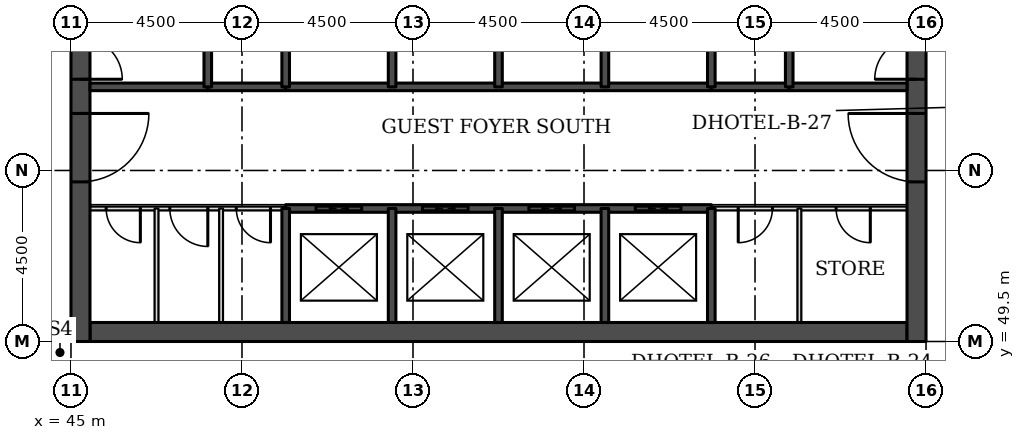
"""IFC4 building model, lengths in metres.
Left out: names, types, materials, properties, quantities, classifications, styles, units other than length and angle.
Written with IfcOpenShell. Run it as: python <this file> out.ifc"""

import sys

from ifc_helpers import new_model, si_unit, direction, frame, frame_2d, origin, place, context, subcontext, project, spatial, rectangle, extrude, element, fill, save


model = new_model("IFC4")
c1 = context("Model", 3, precision=1e-05, world=origin(), true_north=direction((0.0, 1.0)))
c2 = subcontext(c1, "Body", "Model", "MODEL_VIEW")
j1 = project(units=[si_unit("LENGTHUNIT", "METRE"), si_unit("PLANEANGLEUNIT", "RADIAN")], contexts=[c1])
p1 = place(None, origin())
s1 = spatial("IfcSite", under=j1, at=p1, CompositionType="ELEMENT")
p2 = place(p1, origin())
s2 = spatial("IfcBuilding", under=s1, at=p2, CompositionType="ELEMENT")
p3 = place(p2, frame((0.0, 0.0, 52.8)))
s3 = spatial("IfcBuildingStorey", under=s2, at=p3, CompositionType="ELEMENT", Elevation=52.8)
p4 = place(p3, frame((45.5, 49.75, 0.0), z_axis=(0.0, 0.0, 1.0), x_axis=(1.0, 0.0, 0.0)))
e1 = element("IfcWall", 1, at=p4, inside=s3, PredefinedType="SHEAR", context=c2, shape_type="SweptSolid", body=[
    extrude(rectangle(XDim=21.5, YDim=0.5, at=frame_2d((10.75, 0.0))), origin(), (0.0, 0.0, 1.0), 3.3),
])
p5 = place(p3, frame((45.25, 49.5, 0.0), z_axis=(0.0, 0.0, 1.0), x_axis=(0.0, 1.0, 0.0)))
e2 = element("IfcWall", 2, at=p5, inside=s3, PredefinedType="SHEAR", context=c2, shape_type="SweptSolid", body=[
    extrude(rectangle(XDim=22.5, YDim=0.5, at=frame_2d((11.25, 0.0))), origin(), (0.0, 0.0, 1.0), 3.3),
])
p6 = place(p5, frame((4.2, 0.0, 0.0)))
e3 = element("IfcOpeningElement", 3, at=p6, cuts=e2, PredefinedType="OPENING", context=c2, shape_type="SweptSolid", body=[
    extrude(rectangle(XDim=1.8, YDim=2.1, at=frame_2d((0.9, 1.05))), frame((0.0, 0.26, 0.0), z_axis=(0.0, -1.0, 0.0), x_axis=(1.0, 0.0, 0.0)), (0.0, 0.0, 1.0), 0.52),
])
p7 = place(p5, frame((6.9, 0.0, 0.0)))
e4 = element("IfcOpeningElement", 4, at=p7, cuts=e2, PredefinedType="OPENING", context=c2, shape_type="SweptSolid", body=[
    extrude(rectangle(XDim=1.1, YDim=2.1, at=frame_2d((0.55, 1.05))), frame((0.0, 0.26, 0.0), z_axis=(0.0, -1.0, 0.0), x_axis=(1.0, 0.0, 0.0)), (0.0, 0.0, 1.0), 0.52),
])
p8 = place(p5, frame((13.6, 0.0, 0.0)))
e5 = element("IfcOpeningElement", 5, at=p8, cuts=e2, PredefinedType="OPENING", context=c2, shape_type="SweptSolid", body=[
    extrude(rectangle(XDim=1.1, YDim=2.1, at=frame_2d((0.55, 1.05))), frame((0.0, 0.26, 0.0), z_axis=(0.0, -1.0, 0.0), x_axis=(1.0, 0.0, 0.0)), (0.0, 0.0, 1.0), 0.52),
])
p9 = place(p5, frame((16.5, 0.0, 0.0)))
e6 = element("IfcOpeningElement", 6, at=p9, cuts=e2, PredefinedType="OPENING", context=c2, shape_type="SweptSolid", body=[
    extrude(rectangle(XDim=1.8, YDim=2.1, at=frame_2d((0.9, 1.05))), frame((0.0, 0.26, 0.0), z_axis=(0.0, -1.0, 0.0), x_axis=(1.0, 0.0, 0.0)), (0.0, 0.0, 1.0), 0.52),
])
p10 = place(p3, frame((67.25, 49.5, 0.0), z_axis=(0.0, 0.0, 1.0), x_axis=(0.0, 1.0, 0.0)))
e7 = element("IfcWall", 7, at=p10, inside=s3, PredefinedType="SHEAR", context=c2, shape_type="SweptSolid", body=[
    extrude(rectangle(XDim=22.5, YDim=0.5, at=frame_2d((11.25, 0.0))), origin(), (0.0, 0.0, 1.0), 3.3),
])
p11 = place(p10, frame((4.2, 0.0, 0.0)))
e8 = element("IfcOpeningElement", 8, at=p11, cuts=e7, PredefinedType="OPENING", context=c2, shape_type="SweptSolid", body=[
    extrude(rectangle(XDim=1.8, YDim=2.1, at=frame_2d((0.9, 1.05))), frame((0.0, 0.26, 0.0), z_axis=(0.0, -1.0, 0.0), x_axis=(1.0, 0.0, 0.0)), (0.0, 0.0, 1.0), 0.52),
])
p12 = place(p10, frame((6.9, 0.0, 0.0)))
e9 = element("IfcOpeningElement", 9, at=p12, cuts=e7, PredefinedType="OPENING", context=c2, shape_type="SweptSolid", body=[
    extrude(rectangle(XDim=1.1, YDim=2.1, at=frame_2d((0.55, 1.05))), frame((0.0, 0.26, 0.0), z_axis=(0.0, -1.0, 0.0), x_axis=(1.0, 0.0, 0.0)), (0.0, 0.0, 1.0), 0.52),
])
p13 = place(p10, frame((13.6, 0.0, 0.0)))
e10 = element("IfcOpeningElement", 10, at=p13, cuts=e7, PredefinedType="OPENING", context=c2, shape_type="SweptSolid", body=[
    extrude(rectangle(XDim=1.1, YDim=2.1, at=frame_2d((0.55, 1.05))), frame((0.0, 0.26, 0.0), z_axis=(0.0, -1.0, 0.0), x_axis=(1.0, 0.0, 0.0)), (0.0, 0.0, 1.0), 0.52),
])
p14 = place(p10, frame((16.5, 0.0, 0.0)))
e11 = element("IfcOpeningElement", 11, at=p14, cuts=e7, PredefinedType="OPENING", context=c2, shape_type="SweptSolid", body=[
    extrude(rectangle(XDim=1.8, YDim=2.1, at=frame_2d((0.9, 1.05))), frame((0.0, 0.26, 0.0), z_axis=(0.0, -1.0, 0.0), x_axis=(1.0, 0.0, 0.0)), (0.0, 0.0, 1.0), 0.52),
])
p15 = place(p3, frame((45.5, 53.0, 0.0), z_axis=(0.0, 0.0, 1.0), x_axis=(1.0, 0.0, 0.0)))
e12 = element("IfcWall", 12, at=p15, inside=s3, PredefinedType="PARTITIONING", context=c2, shape_type="SweptSolid", body=[
    extrude(rectangle(XDim=5.15, YDim=0.1, at=frame_2d((2.575, 0.0))), origin(), (0.0, 0.0, 1.0), 3.08),
])
p16 = place(p15, frame((0.426, 0.0, 0.0)))
e13 = element("IfcOpeningElement", 13, at=p16, cuts=e12, PredefinedType="OPENING", context=c2, shape_type="SweptSolid", body=[
    extrude(rectangle(XDim=0.9, YDim=2.1, at=frame_2d((0.45, 1.05))), frame((0.0, 0.06, 0.0), z_axis=(0.0, -1.0, 0.0), x_axis=(1.0, 0.0, 0.0)), (0.0, 0.0, 1.0), 0.12),
])
p17 = place(p15, frame((2.101, 0.0, 0.0)))
e14 = element("IfcOpeningElement", 14, at=p17, cuts=e12, PredefinedType="OPENING", context=c2, shape_type="SweptSolid", body=[
    extrude(rectangle(XDim=1.0, YDim=2.1, at=frame_2d((0.5, 1.05))), frame((0.0, 0.06, 0.0), z_axis=(0.0, -1.0, 0.0), x_axis=(1.0, 0.0, 0.0)), (0.0, 0.0, 1.0), 0.12),
])
p18 = place(p15, frame((3.85, 0.0, 0.0)))
e15 = element("IfcOpeningElement", 15, at=p18, cuts=e12, PredefinedType="OPENING", context=c2, shape_type="SweptSolid", body=[
    extrude(rectangle(XDim=0.9, YDim=2.1, at=frame_2d((0.45, 1.05))), frame((0.0, 0.06, 0.0), z_axis=(0.0, -1.0, 0.0), x_axis=(1.0, 0.0, 0.0)), (0.0, 0.0, 1.0), 0.12),
])
p19 = place(p3, frame((61.85, 53.0, 0.0), z_axis=(0.0, 0.0, 1.0), x_axis=(1.0, 0.0, 0.0)))
e16 = element("IfcWall", 16, at=p19, inside=s3, PredefinedType="PARTITIONING", context=c2, shape_type="SweptSolid", body=[
    extrude(rectangle(XDim=5.15, YDim=0.1, at=frame_2d((2.575, 0.0))), origin(), (0.0, 0.0, 1.0), 3.08),
])
p20 = place(p19, frame((3.284, 0.0, 0.0)))
e17 = element("IfcOpeningElement", 17, at=p20, cuts=e16, PredefinedType="OPENING", context=c2, shape_type="SweptSolid", body=[
    extrude(rectangle(XDim=0.9, YDim=2.1, at=frame_2d((0.45, 1.05))), frame((0.0, 0.06, 0.0), z_axis=(0.0, -1.0, 0.0), x_axis=(1.0, 0.0, 0.0)), (0.0, 0.0, 1.0), 0.12),
])
p21 = place(p19, frame((0.709, 0.0, 0.0)))
e18 = element("IfcOpeningElement", 18, at=p21, cuts=e16, PredefinedType="OPENING", context=c2, shape_type="SweptSolid", body=[
    extrude(rectangle(XDim=0.9, YDim=2.1, at=frame_2d((0.45, 1.05))), frame((0.0, 0.06, 0.0), z_axis=(0.0, -1.0, 0.0), x_axis=(1.0, 0.0, 0.0)), (0.0, 0.0, 1.0), 0.12),
])
p22 = place(p3, frame((50.65, 53.0, 0.0), z_axis=(0.0, 0.0, 1.0), x_axis=(1.0, 0.0, 0.0)))
e19 = element("IfcWall", 19, at=p22, inside=s3, PredefinedType="SOLIDWALL", context=c2, shape_type="SweptSolid", body=[
    extrude(rectangle(XDim=11.2, YDim=0.2, at=frame_2d((5.6, 0.0))), origin(), (0.0, 0.0, 1.0), 3.08),
])
p23 = place(p22, frame((0.8, 0.0, 0.0)))
e20 = element("IfcOpeningElement", 20, at=p23, cuts=e19, PredefinedType="OPENING", context=c2, shape_type="SweptSolid", body=[
    extrude(rectangle(XDim=1.2, YDim=2.1, at=frame_2d((0.6, 1.05))), frame((0.0, 0.11, 0.0), z_axis=(0.0, -1.0, 0.0), x_axis=(1.0, 0.0, 0.0)), (0.0, 0.0, 1.0), 0.22),
])
p24 = place(p22, frame((3.6, 0.0, 0.0)))
e21 = element("IfcOpeningElement", 21, at=p24, cuts=e19, PredefinedType="OPENING", context=c2, shape_type="SweptSolid", body=[
    extrude(rectangle(XDim=1.2, YDim=2.1, at=frame_2d((0.6, 1.05))), frame((0.0, 0.11, 0.0), z_axis=(0.0, -1.0, 0.0), x_axis=(1.0, 0.0, 0.0)), (0.0, 0.0, 1.0), 0.22),
])
p25 = place(p22, frame((6.4, 0.0, 0.0)))
e22 = element("IfcOpeningElement", 22, at=p25, cuts=e19, PredefinedType="OPENING", context=c2, shape_type="SweptSolid", body=[
    extrude(rectangle(XDim=1.2, YDim=2.1, at=frame_2d((0.6, 1.05))), frame((0.0, 0.11, 0.0), z_axis=(0.0, -1.0, 0.0), x_axis=(1.0, 0.0, 0.0)), (0.0, 0.0, 1.0), 0.22),
])
p26 = place(p22, frame((9.2, 0.0, 0.0)))
e23 = element("IfcOpeningElement", 23, at=p26, cuts=e19, PredefinedType="OPENING", context=c2, shape_type="SweptSolid", body=[
    extrude(rectangle(XDim=1.2, YDim=2.1, at=frame_2d((0.6, 1.05))), frame((0.0, 0.11, 0.0), z_axis=(0.0, -1.0, 0.0), x_axis=(1.0, 0.0, 0.0)), (0.0, 0.0, 1.0), 0.22),
])
for number, where, z_axis, x_axis in (
    (24, (48.6, 56.2, 0.0), (0.0, 0.0, 1.0), (1.0, 0.0, 0.0)),
    (25, (61.85, 56.2, 0.0), (0.0, 0.0, 1.0), (1.0, 0.0, 0.0)),
):
    element("IfcWall", number, at=place(p3, frame(where, z_axis=z_axis, x_axis=x_axis)), inside=s3, PredefinedType="SOLIDWALL", context=c2, shape_type="SweptSolid", body=[
        extrude(rectangle(XDim=2.05, YDim=0.2, at=frame_2d((1.025, 0.0))), origin(), (0.0, 0.0, 1.0), 3.08),
    ])
p27 = place(p3, frame((45.5, 56.2, 0.0), z_axis=(0.0, 0.0, 1.0), x_axis=(1.0, 0.0, 0.0)))
e26 = element("IfcWall", 26, at=p27, inside=s3, PredefinedType="SOLIDWALL", context=c2, shape_type="SweptSolid", body=[
    extrude(rectangle(XDim=3.1, YDim=0.2, at=frame_2d((1.55, 0.0))), origin(), (0.0, 0.0, 1.0), 3.08),
])
p28 = place(p3, frame((50.65, 56.2, 0.0), z_axis=(0.0, 0.0, 1.0), x_axis=(1.0, 0.0, 0.0)))
e27 = element("IfcWall", 27, at=p28, inside=s3, PredefinedType="SOLIDWALL", context=c2, shape_type="SweptSolid", body=[
    extrude(rectangle(XDim=11.2, YDim=0.2, at=frame_2d((5.6, 0.0))), origin(), (0.0, 0.0, 1.0), 3.08),
])
p29 = place(p3, frame((63.9, 56.2, 0.0), z_axis=(0.0, 0.0, 1.0), x_axis=(1.0, 0.0, 0.0)))
e28 = element("IfcWall", 28, at=p29, inside=s3, PredefinedType="SOLIDWALL", context=c2, shape_type="SweptSolid", body=[
    extrude(rectangle(XDim=3.1, YDim=0.2, at=frame_2d((1.55, 0.0))), origin(), (0.0, 0.0, 1.0), 3.08),
])
p30 = place(p3, frame((47.251, 50.0, 0.0), z_axis=(0.0, 0.0, 1.0), x_axis=(0.0, 1.0, 0.0)))
e29 = element("IfcWall", 29, at=p30, inside=s3, PredefinedType="PARTITIONING", context=c2, shape_type="SweptSolid", body=[
    extrude(rectangle(XDim=3.0, YDim=0.1, at=frame_2d((1.5, 0.0))), origin(), (0.0, 0.0, 1.0), 3.08),
])
p31 = place(p3, frame((48.6, 56.2, 0.0), z_axis=(0.0, 0.0, 1.0), x_axis=(0.0, 1.0, 0.0)))
e30 = element("IfcWall", 30, at=p31, inside=s3, PredefinedType="SOLIDWALL", context=c2, shape_type="SweptSolid", body=[
    extrude(rectangle(XDim=5.8, YDim=0.2, at=frame_2d((2.9, 0.0))), origin(), (0.0, 0.0, 1.0), 3.08),
])
p32 = place(p3, frame((48.95, 50.0, 0.0), z_axis=(0.0, 0.0, 1.0), x_axis=(0.0, 1.0, 0.0)))
e31 = element("IfcWall", 31, at=p32, inside=s3, PredefinedType="PARTITIONING", context=c2, shape_type="SweptSolid", body=[
    extrude(rectangle(XDim=3.0, YDim=0.1, at=frame_2d((1.5, 0.0))), origin(), (0.0, 0.0, 1.0), 3.08),
])
p33 = place(p3, frame((50.65, 50.0, 0.0), z_axis=(0.0, 0.0, 1.0), x_axis=(0.0, 1.0, 0.0)))
e32 = element("IfcWall", 32, at=p33, inside=s3, PredefinedType="SOLIDWALL", context=c2, shape_type="SweptSolid", body=[
    extrude(rectangle(XDim=3.0, YDim=0.2, at=frame_2d((1.5, 0.0))), origin(), (0.0, 0.0, 1.0), 3.08),
])
p34 = place(p3, frame((50.65, 56.2, 0.0), z_axis=(0.0, 0.0, 1.0), x_axis=(0.0, 1.0, 0.0)))
e33 = element("IfcWall", 33, at=p34, inside=s3, PredefinedType="SOLIDWALL", context=c2, shape_type="SweptSolid", body=[
    extrude(rectangle(XDim=2.8, YDim=0.2, at=frame_2d((1.4, 0.0))), origin(), (0.0, 0.0, 1.0), 3.08),
])
p35 = place(p3, frame((53.45, 50.0, 0.0), z_axis=(0.0, 0.0, 1.0), x_axis=(0.0, 1.0, 0.0)))
e34 = element("IfcWall", 34, at=p35, inside=s3, PredefinedType="SOLIDWALL", context=c2, shape_type="SweptSolid", body=[
    extrude(rectangle(XDim=3.0, YDim=0.2, at=frame_2d((1.5, 0.0))), origin(), (0.0, 0.0, 1.0), 3.08),
])
p36 = place(p3, frame((53.45, 56.2, 0.0), z_axis=(0.0, 0.0, 1.0), x_axis=(0.0, 1.0, 0.0)))
e35 = element("IfcWall", 35, at=p36, inside=s3, PredefinedType="SOLIDWALL", context=c2, shape_type="SweptSolid", body=[
    extrude(rectangle(XDim=2.8, YDim=0.2, at=frame_2d((1.4, 0.0))), origin(), (0.0, 0.0, 1.0), 3.08),
])
p37 = place(p3, frame((56.25, 50.0, 0.0), z_axis=(0.0, 0.0, 1.0), x_axis=(0.0, 1.0, 0.0)))
e36 = element("IfcWall", 36, at=p37, inside=s3, PredefinedType="SOLIDWALL", context=c2, shape_type="SweptSolid", body=[
    extrude(rectangle(XDim=3.0, YDim=0.2, at=frame_2d((1.5, 0.0))), origin(), (0.0, 0.0, 1.0), 3.08),
])
p38 = place(p3, frame((56.25, 56.2, 0.0), z_axis=(0.0, 0.0, 1.0), x_axis=(0.0, 1.0, 0.0)))
e37 = element("IfcWall", 37, at=p38, inside=s3, PredefinedType="SOLIDWALL", context=c2, shape_type="SweptSolid", body=[
    extrude(rectangle(XDim=2.8, YDim=0.2, at=frame_2d((1.4, 0.0))), origin(), (0.0, 0.0, 1.0), 3.08),
])
p39 = place(p3, frame((59.05, 50.0, 0.0), z_axis=(0.0, 0.0, 1.0), x_axis=(0.0, 1.0, 0.0)))
e38 = element("IfcWall", 38, at=p39, inside=s3, PredefinedType="SOLIDWALL", context=c2, shape_type="SweptSolid", body=[
    extrude(rectangle(XDim=3.0, YDim=0.2, at=frame_2d((1.5, 0.0))), origin(), (0.0, 0.0, 1.0), 3.08),
])
p40 = place(p3, frame((59.05, 56.2, 0.0), z_axis=(0.0, 0.0, 1.0), x_axis=(0.0, 1.0, 0.0)))
e39 = element("IfcWall", 39, at=p40, inside=s3, PredefinedType="SOLIDWALL", context=c2, shape_type="SweptSolid", body=[
    extrude(rectangle(XDim=2.8, YDim=0.2, at=frame_2d((1.4, 0.0))), origin(), (0.0, 0.0, 1.0), 3.08),
])
p41 = place(p3, frame((61.85, 50.0, 0.0), z_axis=(0.0, 0.0, 1.0), x_axis=(0.0, 1.0, 0.0)))
e40 = element("IfcWall", 40, at=p41, inside=s3, PredefinedType="SOLIDWALL", context=c2, shape_type="SweptSolid", body=[
    extrude(rectangle(XDim=3.0, YDim=0.2, at=frame_2d((1.5, 0.0))), origin(), (0.0, 0.0, 1.0), 3.08),
])
p42 = place(p3, frame((61.85, 56.2, 0.0), z_axis=(0.0, 0.0, 1.0), x_axis=(0.0, 1.0, 0.0)))
e41 = element("IfcWall", 41, at=p42, inside=s3, PredefinedType="SOLIDWALL", context=c2, shape_type="SweptSolid", body=[
    extrude(rectangle(XDim=2.8, YDim=0.2, at=frame_2d((1.4, 0.0))), origin(), (0.0, 0.0, 1.0), 3.08),
])
p43 = place(p3, frame((63.9, 56.2, 0.0), z_axis=(0.0, 0.0, 1.0), x_axis=(0.0, 1.0, 0.0)))
e42 = element("IfcWall", 42, at=p43, inside=s3, PredefinedType="SOLIDWALL", context=c2, shape_type="SweptSolid", body=[
    extrude(rectangle(XDim=5.8, YDim=0.2, at=frame_2d((2.9, 0.0))), origin(), (0.0, 0.0, 1.0), 3.08),
])
p44 = place(p3, frame((64.167, 50.0, 0.0), z_axis=(0.0, 0.0, 1.0), x_axis=(0.0, 1.0, 0.0)))
e43 = element("IfcWall", 43, at=p44, inside=s3, PredefinedType="PARTITIONING", context=c2, shape_type="SweptSolid", body=[
    extrude(rectangle(XDim=3.0, YDim=0.1, at=frame_2d((1.5, 0.0))), origin(), (0.0, 0.0, 1.0), 3.08),
])
p45 = place(p23, origin())
e44 = element("IfcDoor", 44, at=p45, inside=s3, OperationType="DOUBLE_DOOR_SLIDING", PredefinedType="DOOR", context=c2, shape_type="SweptSolid", body=[
    extrude(rectangle(XDim=1.2, YDim=2.1, at=frame_2d((0.6, 1.05))), frame((0.0, 0.025, 0.0), z_axis=(0.0, -1.0, 0.0), x_axis=(1.0, 0.0, 0.0)), (0.0, 0.0, 1.0), 0.05),
])
fill(e20, e44)
p46 = place(p24, origin())
e45 = element("IfcDoor", 45, at=p46, inside=s3, OperationType="DOUBLE_DOOR_SLIDING", PredefinedType="DOOR", context=c2, shape_type="SweptSolid", body=[
    extrude(rectangle(XDim=1.2, YDim=2.1, at=frame_2d((0.6, 1.05))), frame((0.0, 0.025, 0.0), z_axis=(0.0, -1.0, 0.0), x_axis=(1.0, 0.0, 0.0)), (0.0, 0.0, 1.0), 0.05),
])
fill(e21, e45)
p47 = place(p25, origin())
e46 = element("IfcDoor", 46, at=p47, inside=s3, OperationType="DOUBLE_DOOR_SLIDING", PredefinedType="DOOR", context=c2, shape_type="SweptSolid", body=[
    extrude(rectangle(XDim=1.2, YDim=2.1, at=frame_2d((0.6, 1.05))), frame((0.0, 0.025, 0.0), z_axis=(0.0, -1.0, 0.0), x_axis=(1.0, 0.0, 0.0)), (0.0, 0.0, 1.0), 0.05),
])
fill(e22, e46)
p48 = place(p26, origin())
e47 = element("IfcDoor", 47, at=p48, inside=s3, OperationType="DOUBLE_DOOR_SLIDING", PredefinedType="DOOR", context=c2, shape_type="SweptSolid", body=[
    extrude(rectangle(XDim=1.2, YDim=2.1, at=frame_2d((0.6, 1.05))), frame((0.0, 0.025, 0.0), z_axis=(0.0, -1.0, 0.0), x_axis=(1.0, 0.0, 0.0)), (0.0, 0.0, 1.0), 0.05),
])
fill(e23, e47)
p49 = place(p6, frame((1.8, 0.0, 0.0), z_axis=(0.0, 0.0, 1.0), x_axis=(-1.0, 0.0, 0.0)))
e48 = element("IfcDoor", 48, at=p49, inside=s3, OperationType="SINGLE_SWING_LEFT", PredefinedType="DOOR", context=c2, shape_type="SweptSolid", body=[
    extrude(rectangle(XDim=1.8, YDim=2.1, at=frame_2d((0.9, 1.05))), frame((0.0, 0.025, 0.0), z_axis=(0.0, -1.0, 0.0), x_axis=(1.0, 0.0, 0.0)), (0.0, 0.0, 1.0), 0.05),
])
fill(e3, e48)
p50 = place(p7, frame((1.1, 0.0, 0.0), z_axis=(0.0, 0.0, 1.0), x_axis=(-1.0, 0.0, 0.0)))
e49 = element("IfcDoor", 49, at=p50, inside=s3, OperationType="SINGLE_SWING_RIGHT", PredefinedType="DOOR", context=c2, shape_type="SweptSolid", body=[
    extrude(rectangle(XDim=1.1, YDim=2.1, at=frame_2d((0.55, 1.05))), frame((0.0, 0.025, 0.0), z_axis=(0.0, -1.0, 0.0), x_axis=(1.0, 0.0, 0.0)), (0.0, 0.0, 1.0), 0.05),
])
fill(e4, e49)
p51 = place(p11, origin())
e50 = element("IfcDoor", 50, at=p51, inside=s3, OperationType="SINGLE_SWING_RIGHT", PredefinedType="DOOR", context=c2, shape_type="SweptSolid", body=[
    extrude(rectangle(XDim=1.8, YDim=2.1, at=frame_2d((0.9, 1.05))), frame((0.0, 0.025, 0.0), z_axis=(0.0, -1.0, 0.0), x_axis=(1.0, 0.0, 0.0)), (0.0, 0.0, 1.0), 0.05),
])
fill(e8, e50)
p52 = place(p12, origin())
e51 = element("IfcDoor", 51, at=p52, inside=s3, OperationType="SINGLE_SWING_LEFT", PredefinedType="DOOR", context=c2, shape_type="SweptSolid", body=[
    extrude(rectangle(XDim=1.1, YDim=2.1, at=frame_2d((0.55, 1.05))), frame((0.0, 0.025, 0.0), z_axis=(0.0, -1.0, 0.0), x_axis=(1.0, 0.0, 0.0)), (0.0, 0.0, 1.0), 0.05),
])
fill(e9, e51)
p53 = place(p20, frame((0.9, 0.0, 0.0), z_axis=(0.0, 0.0, 1.0), x_axis=(-1.0, 0.0, 0.0)))
e52 = element("IfcDoor", 52, at=p53, inside=s3, OperationType="SINGLE_SWING_LEFT", PredefinedType="DOOR", context=c2, shape_type="SweptSolid", body=[
    extrude(rectangle(XDim=0.9, YDim=2.1, at=frame_2d((0.45, 1.05))), frame((0.0, 0.025, 0.0), z_axis=(0.0, -1.0, 0.0), x_axis=(1.0, 0.0, 0.0)), (0.0, 0.0, 1.0), 0.05),
])
fill(e17, e52)
p54 = place(p21, frame((0.9, 0.0, 0.0), z_axis=(0.0, 0.0, 1.0), x_axis=(-1.0, 0.0, 0.0)))
e53 = element("IfcDoor", 53, at=p54, inside=s3, OperationType="SINGLE_SWING_RIGHT", PredefinedType="DOOR", context=c2, shape_type="SweptSolid", body=[
    extrude(rectangle(XDim=0.9, YDim=2.1, at=frame_2d((0.45, 1.05))), frame((0.0, 0.025, 0.0), z_axis=(0.0, -1.0, 0.0), x_axis=(1.0, 0.0, 0.0)), (0.0, 0.0, 1.0), 0.05),
])
fill(e18, e53)
p55 = place(p16, frame((0.9, 0.0, 0.0), z_axis=(0.0, 0.0, 1.0), x_axis=(-1.0, 0.0, 0.0)))
e54 = element("IfcDoor", 54, at=p55, inside=s3, OperationType="SINGLE_SWING_LEFT", PredefinedType="DOOR", context=c2, shape_type="SweptSolid", body=[
    extrude(rectangle(XDim=0.9, YDim=2.1, at=frame_2d((0.45, 1.05))), frame((0.0, 0.025, 0.0), z_axis=(0.0, -1.0, 0.0), x_axis=(1.0, 0.0, 0.0)), (0.0, 0.0, 1.0), 0.05),
])
fill(e13, e54)
p56 = place(p17, frame((1.0, 0.0, 0.0), z_axis=(0.0, 0.0, 1.0), x_axis=(-1.0, 0.0, 0.0)))
e55 = element("IfcDoor", 55, at=p56, inside=s3, OperationType="SINGLE_SWING_LEFT", PredefinedType="DOOR", context=c2, shape_type="SweptSolid", body=[
    extrude(rectangle(XDim=1.0, YDim=2.1, at=frame_2d((0.5, 1.05))), frame((0.0, 0.025, 0.0), z_axis=(0.0, -1.0, 0.0), x_axis=(1.0, 0.0, 0.0)), (0.0, 0.0, 1.0), 0.05),
])
fill(e14, e55)
p57 = place(p18, frame((0.9, 0.0, 0.0), z_axis=(0.0, 0.0, 1.0), x_axis=(-1.0, 0.0, 0.0)))
e56 = element("IfcDoor", 56, at=p57, inside=s3, OperationType="SINGLE_SWING_LEFT", PredefinedType="DOOR", context=c2, shape_type="SweptSolid", body=[
    extrude(rectangle(XDim=0.9, YDim=2.1, at=frame_2d((0.45, 1.05))), frame((0.0, 0.025, 0.0), z_axis=(0.0, -1.0, 0.0), x_axis=(1.0, 0.0, 0.0)), (0.0, 0.0, 1.0), 0.05),
])
fill(e15, e56)
save(model, sys.argv[1])
